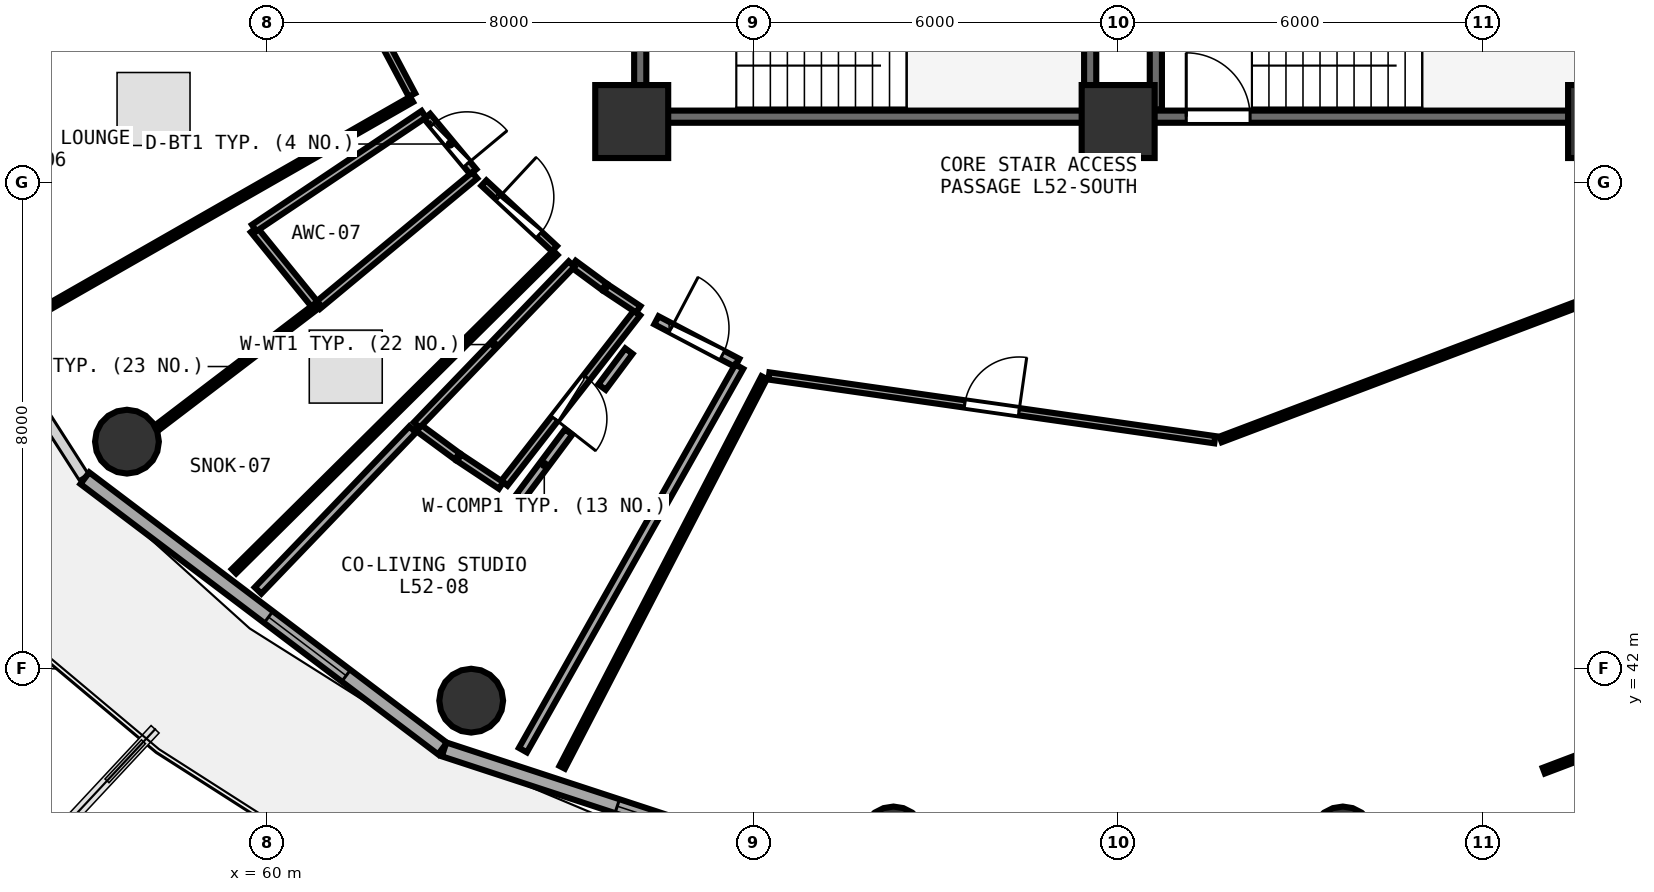
"""IFC4 building model, lengths in metres.
Left out: names, types, materials, properties, quantities, classifications, styles, units other than length and angle.
Written with IfcOpenShell. Run it as: python <this file> out.ifc"""

import sys

from ifc_helpers import new_model, si_unit, direction, frame, frame_2d, origin, origin_2d, place, context, subcontext, project, spatial, rectangle, circle, extrude, element, fill, save


model = new_model("IFC4")
c1 = context("Model", 3, precision=1e-05, world=origin(), true_north=direction((0.0, 1.0)))
c2 = subcontext(c1, "Body", "Model", "MODEL_VIEW")
j1 = project(units=[si_unit("LENGTHUNIT", "METRE"), si_unit("PLANEANGLEUNIT", "RADIAN")], contexts=[c1])
p1 = place(None, origin())
s1 = spatial("IfcSite", under=j1, at=p1, CompositionType="ELEMENT")
p2 = place(p1, origin())
s2 = spatial("IfcBuilding", under=s1, at=p2, CompositionType="ELEMENT")
p3 = place(p2, frame((0.0, 0.0, 204.45)))
s3 = spatial("IfcBuildingStorey", under=s2, at=p3, CompositionType="ELEMENT", Elevation=204.45)
for number, where, z_axis, x_axis in (
    (1, (66.0, 51.0, 0.0), (0.0, 0.0, 1.0), (1.0, 0.0, 0.0)),
    (2, (74.0, 51.0, 0.0), (0.0, 0.0, 1.0), (1.0, 0.0, 0.0)),
    (3, (82.0, 51.0, 0.0), (0.0, 0.0, 1.0), (1.0, 0.0, 0.0)),
):
    element("IfcColumn", number, at=place(p3, frame(where, z_axis=z_axis, x_axis=x_axis)), inside=s3, PredefinedType="PILASTER", context=c2, shape_type="SweptSolid", body=[
        extrude(rectangle(XDim=1.2, YDim=1.2, at=origin_2d()), origin(), (0.0, 0.0, 1.0), 3.75),
    ])
for number, where, z_axis, x_axis in (
    (4, (57.698, 45.736, 0.0), (0.0, 0.0, 1.0), (1.0, 0.0, 0.0)),
    (5, (63.36, 41.476, 0.0), (0.0, 0.0, 1.0), (1.0, 0.0, 0.0)),
    (6, (70.305, 39.21, 0.0), (0.0, 0.0, 1.0), (1.0, 0.0, 0.0)),
    (7, (77.695, 39.21, 0.0), (0.0, 0.0, 1.0), (1.0, 0.0, 0.0)),
):
    element("IfcColumn", number, at=place(p3, frame(where, z_axis=z_axis, x_axis=x_axis)), inside=s3, PredefinedType="COLUMN", context=c2, shape_type="SweptSolid", body=[
        extrude(circle(Radius=0.525, at=origin_2d()), origin(), (0.0, 0.0, 1.0), 3.75),
    ])
p4 = place(p3, frame((57.006, 45.135, 0.0), z_axis=(0.0, 0.0, 1.0), x_axis=(0.797701674595, -0.603052268338, 0.0)))
e8 = element("IfcWall", 8, at=p4, inside=s3, PredefinedType="SOLIDWALL", context=c2, shape_type="SweptSolid", body=[
    extrude(rectangle(XDim=7.374, YDim=0.24, at=frame_2d((3.687, 0.0))), origin(), (0.0, 0.0, 1.0), 3.475),
])
p5 = place(p4, frame((3.787, 0.0, 0.85)))
e9 = element("IfcOpeningElement", 9, at=p5, cuts=e8, PredefinedType="OPENING", context=c2, shape_type="SweptSolid", body=[
    extrude(rectangle(XDim=1.6, YDim=1.45, at=frame_2d((0.8, 0.725))), frame((0.0, 0.13, 0.0), z_axis=(0.0, -1.0, 0.0), x_axis=(1.0, 0.0, 0.0)), (0.0, 0.0, 1.0), 0.26),
])
p6 = place(p3, frame((62.914, 40.675, 0.0), z_axis=(0.0, 0.0, 1.0), x_axis=(0.95022142767, -0.31157541366, 0.0)))
e10 = element("IfcWall", 10, at=p6, inside=s3, PredefinedType="SOLIDWALL", context=c2, shape_type="SweptSolid", body=[
    extrude(rectangle(XDim=7.594, YDim=0.24, at=frame_2d((3.797, 0.0))), origin(), (0.0, 0.0, 1.0), 3.475),
])
p7 = place(p6, frame((2.997, 0.0, 0.85)))
e11 = element("IfcOpeningElement", 11, at=p7, cuts=e10, PredefinedType="OPENING", context=c2, shape_type="SweptSolid", body=[
    extrude(rectangle(XDim=1.6, YDim=1.45, at=frame_2d((0.8, 0.725))), frame((0.0, 0.13, 0.0), z_axis=(0.0, -1.0, 0.0), x_axis=(1.0, 0.0, 0.0)), (0.0, 0.0, 1.0), 0.26),
])
p8 = place(p3, frame((74.0, 51.08, 0.0), z_axis=(0.0, 0.0, 1.0), x_axis=(1.0, 0.0, 0.0)))
e12 = element("IfcWall", 12, at=p8, inside=s3, PredefinedType="SHEAR", context=c2, shape_type="SweptSolid", body=[
    extrude(rectangle(XDim=7.9, YDim=0.2, at=frame_2d((3.95, 0.0))), origin(), (0.0, 0.0, 1.0), 3.49),
])
p9 = place(p8, frame((1.12, 0.0, 0.0)))
e13 = element("IfcOpeningElement", 13, at=p9, cuts=e12, PredefinedType="OPENING", context=c2, shape_type="SweptSolid", body=[
    extrude(rectangle(XDim=1.05, YDim=2.1, at=frame_2d((0.525, 1.05))), frame((0.0, 0.11, 0.0), z_axis=(0.0, -1.0, 0.0), x_axis=(1.0, 0.0, 0.0)), (0.0, 0.0, 1.0), 0.22),
])
p10 = place(p3, frame((74.62, 54.27, 0.0), z_axis=(0.0, 0.0, 1.0), x_axis=(0.0, -1.0, 0.0)))
e14 = element("IfcWall", 14, at=p10, inside=s3, PredefinedType="SHEAR", context=c2, shape_type="SweptSolid", body=[
    extrude(rectangle(XDim=3.07, YDim=0.2, at=frame_2d((1.535, 0.0))), origin(), (0.0, 0.0, 1.0), 3.49),
])
p11 = place(p3, frame((66.26, 51.08, 0.0), z_axis=(0.0, 0.0, 1.0), x_axis=(1.0, 0.0, 0.0)))
e15 = element("IfcWall", 15, at=p11, inside=s3, PredefinedType="SHEAR", context=c2, shape_type="SweptSolid", body=[
    extrude(rectangle(XDim=7.16, YDim=0.2, at=frame_2d((3.58, 0.0))), origin(), (0.0, 0.0, 1.0), 3.49),
])
p12 = place(p3, frame((73.54, 51.2, 0.0), z_axis=(0.0, 0.0, 1.0), x_axis=(0.0, 1.0, 0.0)))
e16 = element("IfcWall", 16, at=p12, inside=s3, PredefinedType="SHEAR", context=c2, shape_type="SweptSolid", body=[
    extrude(rectangle(XDim=3.07, YDim=0.2, at=frame_2d((1.535, 0.0))), origin(), (0.0, 0.0, 1.0), 3.49),
])
p13 = place(p3, frame((66.14, 54.27, 0.0), z_axis=(0.0, 0.0, 1.0), x_axis=(0.0, -1.0, 0.0)))
e17 = element("IfcWall", 17, at=p13, inside=s3, PredefinedType="SHEAR", context=c2, shape_type="SweptSolid", body=[
    extrude(rectangle(XDim=3.07, YDim=0.2, at=frame_2d((1.535, 0.0))), origin(), (0.0, 0.0, 1.0), 3.49),
])
p14 = place(p13, frame((1.01, 0.0, 0.0)))
e18 = element("IfcOpeningElement", 18, at=p14, cuts=e17, PredefinedType="OPENING", context=c2, shape_type="SweptSolid", body=[
    extrude(rectangle(XDim=1.05, YDim=2.1, at=frame_2d((0.525, 1.05))), frame((0.0, 0.11, 0.0), z_axis=(0.0, -1.0, 0.0), x_axis=(1.0, 0.0, 0.0)), (0.0, 0.0, 1.0), 0.22),
])
p15 = place(p3, frame((68.256, 46.816, 0.0), z_axis=(0.0, 0.0, 1.0), x_axis=(0.989926410659, -0.141582843167, 0.0)))
e19 = element("IfcWall", 19, at=p15, inside=s3, PredefinedType="PARTITIONING", context=c2, shape_type="SweptSolid", body=[
    extrude(rectangle(XDim=7.408, YDim=0.12, at=frame_2d((3.704, 0.0))), origin(), (0.0, 0.0, 1.0), 3.025),
])
p16 = place(p15, frame((3.254, 0.0, 0.0)))
e20 = element("IfcOpeningElement", 20, at=p16, cuts=e19, PredefinedType="OPENING", context=c2, shape_type="SweptSolid", body=[
    extrude(rectangle(XDim=0.9, YDim=2.08, at=frame_2d((0.45, 1.04))), frame((0.0, 0.07, 0.0), z_axis=(0.0, -1.0, 0.0), x_axis=(1.0, 0.0, 0.0)), (0.0, 0.0, 1.0), 0.14),
])
p17 = place(p3, frame((61.009, 54.03, 0.0), z_axis=(0.0, 0.0, 1.0), x_axis=(0.468999166779, -0.883198608219, 0.0)))
e21 = element("IfcWall", 21, at=p17, inside=s3, PredefinedType="PARTITIONING", context=c2, shape_type="SweptSolid", body=[
    extrude(rectangle(XDim=2.936, YDim=0.12, at=frame_2d((1.468, 0.0))), origin(), (0.0, 0.0, 1.0), 3.235),
])
p18 = place(p17, frame((1.018, 0.0, 0.0)))
e22 = element("IfcOpeningElement", 22, at=p18, cuts=e21, PredefinedType="OPENING", context=c2, shape_type="SweptSolid", body=[
    extrude(rectangle(XDim=0.9, YDim=2.08, at=frame_2d((0.45, 1.04))), frame((0.0, 0.07, 0.0), z_axis=(0.0, -1.0, 0.0), x_axis=(1.0, 0.0, 0.0)), (0.0, 0.0, 1.0), 0.14),
])
p19 = place(p3, frame((62.635, 51.086, 0.0), z_axis=(0.0, 0.0, 1.0), x_axis=(0.639759255057, -0.768575367526, 0.0)))
e23 = element("IfcWall", 23, at=p19, inside=s3, PredefinedType="PLUMBINGWALL", context=c2, shape_type="SweptSolid", body=[
    extrude(rectangle(XDim=1.187, YDim=0.13, at=frame_2d((0.593, 0.0))), origin(), (0.0, 0.0, 1.0), 3.025),
])
p20 = place(p19, frame((0.163, 0.0, 0.0)))
e24 = element("IfcOpeningElement", 24, at=p20, cuts=e23, PredefinedType="OPENING", context=c2, shape_type="SweptSolid", body=[
    extrude(rectangle(XDim=0.86, YDim=2.05, at=frame_2d((0.43, 1.025))), frame((0.0, 0.075, 0.0), z_axis=(0.0, -1.0, 0.0), x_axis=(1.0, 0.0, 0.0)), (0.0, 0.0, 1.0), 0.15),
])
p21 = place(p3, frame((63.569, 49.988, 0.0), z_axis=(0.0, 0.0, 1.0), x_axis=(0.732453034456, -0.680817561698, 0.0)))
e25 = element("IfcWall", 25, at=p21, inside=s3, PredefinedType="PARTITIONING", context=c2, shape_type="SweptSolid", body=[
    extrude(rectangle(XDim=1.584, YDim=0.12, at=frame_2d((0.792, 0.0))), origin(), (0.0, 0.0, 1.0), 3.025),
])
p22 = place(p21, frame((0.342, 0.0, 0.0)))
e26 = element("IfcOpeningElement", 26, at=p22, cuts=e25, PredefinedType="OPENING", context=c2, shape_type="SweptSolid", body=[
    extrude(rectangle(XDim=0.9, YDim=2.08, at=frame_2d((0.45, 1.04))), frame((0.0, 0.07, 0.0), z_axis=(0.0, -1.0, 0.0), x_axis=(1.0, 0.0, 0.0)), (0.0, 0.0, 1.0), 0.14),
])
p23 = place(p3, frame((66.088, 47.853, 0.0), z_axis=(0.0, 0.0, 1.0), x_axis=(-0.614711227896, -0.788752246462, 0.0)))
e27 = element("IfcWall", 27, at=p23, inside=s3, PredefinedType="PLUMBINGWALL", context=c2, shape_type="SweptSolid", body=[
    extrude(rectangle(XDim=3.552, YDim=0.13, at=frame_2d((1.776, 0.0))), origin(), (0.0, 0.0, 1.0), 3.025),
])
p24 = place(p23, frame((1.346, 0.0, 0.0)))
e28 = element("IfcOpeningElement", 28, at=p24, cuts=e27, PredefinedType="OPENING", context=c2, shape_type="SweptSolid", body=[
    extrude(rectangle(XDim=0.86, YDim=2.05, at=frame_2d((0.43, 1.025))), frame((0.0, 0.075, 0.0), z_axis=(0.0, -1.0, 0.0), x_axis=(1.0, 0.0, 0.0)), (0.0, 0.0, 1.0), 0.15),
])
p25 = place(p3, frame((66.406, 47.732, 0.0), z_axis=(0.0, 0.0, 1.0), x_axis=(0.884766555002, -0.466034487083, 0.0)))
e29 = element("IfcWall", 29, at=p25, inside=s3, PredefinedType="PARTITIONING", context=c2, shape_type="SweptSolid", body=[
    extrude(rectangle(XDim=1.502, YDim=0.15, at=frame_2d((0.751, 0.0))), origin(), (0.0, 0.0, 1.0), 3.235),
])
p26 = place(p25, frame((0.276, 0.0, 0.0)))
e30 = element("IfcOpeningElement", 30, at=p26, cuts=e29, PredefinedType="OPENING", context=c2, shape_type="SweptSolid", body=[
    extrude(rectangle(XDim=0.95, YDim=2.08, at=frame_2d((0.475, 1.04))), frame((0.0, 0.085, 0.0), z_axis=(0.0, -1.0, 0.0), x_axis=(1.0, 0.0, 0.0)), (0.0, 0.0, 1.0), 0.17),
])
p27 = place(p3, frame((75.686, 45.773, 0.0), z_axis=(0.0, 0.0, 1.0), x_axis=(0.935263689731, 0.353951734945, 0.0)))
e31 = element("IfcWall", 31, at=p27, inside=s3, PredefinedType="PARTITIONING", context=c2, shape_type="SweptSolid", body=[
    extrude(rectangle(XDim=7.355, YDim=0.1, at=frame_2d((3.678, 0.0))), origin(), (0.0, 0.0, 1.0), 3.025),
])
p28 = place(p3, frame((81.849, 40.646, 0.0), z_axis=(0.0, 0.0, 1.0), x_axis=(-0.935240492297, -0.354013024574, 0.0)))
e32 = element("IfcWall", 32, at=p28, inside=s3, PredefinedType="PARTITIONING", context=c2, shape_type="SweptSolid", body=[
    extrude(rectangle(XDim=0.907, YDim=0.1, at=frame_2d((0.454, 0.0))), origin(), (0.0, 0.0, 1.0), 3.075),
])
p29 = place(p3, frame((64.856, 40.381, 0.0), z_axis=(0.0, 0.0, 1.0), x_axis=(0.460220418691, 0.887804689231, 0.0)))
e33 = element("IfcWall", 33, at=p29, inside=s3, PredefinedType="PARTITIONING", context=c2, shape_type="SweptSolid", body=[
    extrude(rectangle(XDim=7.219, YDim=0.1, at=frame_2d((3.609, 0.0))), origin(), (0.0, 0.0, 1.0), 3.075),
])
p30 = place(p3, frame((62.379, 51.364, 0.0), z_axis=(0.0, 0.0, 1.0), x_axis=(-0.868127220156, -0.496341746808, 0.0)))
e34 = element("IfcWall", 34, at=p30, inside=s3, PredefinedType="PARTITIONING", context=c2, shape_type="SweptSolid", body=[
    extrude(rectangle(XDim=7.648, YDim=0.1, at=frame_2d((3.824, 0.0))), origin(), (0.0, 0.0, 1.0), 3.025),
])
p31 = place(p3, frame((54.114, 52.013, 0.0), z_axis=(0.0, 0.0, 1.0), x_axis=(0.957454305291, 0.288584915198, 0.0)))
e35 = element("IfcWall", 35, at=p31, inside=s3, PredefinedType="PARTITIONING", context=c2, shape_type="SweptSolid", body=[
    extrude(rectangle(XDim=7.133, YDim=0.1, at=frame_2d((3.566, 0.0))), origin(), (0.0, 0.0, 1.0), 3.075),
])
p32 = place(p3, frame((63.417, 50.115, 0.0), z_axis=(0.0, 0.0, 1.0), x_axis=(-0.76963081868, -0.638489156477, 0.0)))
e36 = element("IfcWall", 36, at=p32, inside=s3, PredefinedType="PLUMBINGWALL", context=c2, shape_type="SweptSolid", body=[
    extrude(rectangle(XDim=3.36, YDim=0.13, at=frame_2d((1.68, 0.0))), origin(), (0.0, 0.0, 1.0), 3.175),
])
p33 = place(p3, frame((60.803, 47.972, 0.0), z_axis=(0.0, 0.0, 1.0), x_axis=(-0.631048835574, 0.775743106396, 0.0)))
e37 = element("IfcWall", 37, at=p33, inside=s3, PredefinedType="PLUMBINGWALL", context=c2, shape_type="SweptSolid", body=[
    extrude(rectangle(XDim=1.611, YDim=0.13, at=frame_2d((0.806, 0.0))), origin(), (0.0, 0.0, 1.0), 3.175),
])
p34 = place(p3, frame((59.791, 49.249, 0.0), z_axis=(0.0, 0.0, 1.0), x_axis=(0.830403176275, 0.557162960751, 0.0)))
e38 = element("IfcWall", 38, at=p34, inside=s3, PredefinedType="PLUMBINGWALL", context=c2, shape_type="SweptSolid", body=[
    extrude(rectangle(XDim=3.36, YDim=0.13, at=frame_2d((1.68, 0.0))), origin(), (0.0, 0.0, 1.0), 3.025),
])
p35 = place(p3, frame((64.745, 48.841, 0.0), z_axis=(0.0, 0.0, 1.0), x_axis=(-0.710363664194, -0.703834827635, 0.0)))
e39 = element("IfcWall", 39, at=p35, inside=s3, PredefinedType="PARTITIONING", context=c2, shape_type="SweptSolid", body=[
    extrude(rectangle(XDim=7.441, YDim=0.1, at=frame_2d((3.721, 0.0))), origin(), (0.0, 0.0, 1.0), 3.075),
])
p36 = place(p3, frame((58.197, 45.969, 0.0), z_axis=(0.0, 0.0, 1.0), x_axis=(0.79535379018, 0.606145484555, 0.0)))
e40 = element("IfcWall", 40, at=p36, inside=s3, PredefinedType="PARTITIONING", context=c2, shape_type="SweptSolid", body=[
    extrude(rectangle(XDim=3.308, YDim=0.1, at=frame_2d((1.654, 0.0))), origin(), (0.0, 0.0, 1.0), 3.025),
])
p37 = place(p3, frame((65.04, 48.658, 0.0), z_axis=(0.0, 0.0, 1.0), x_axis=(0.804987739936, -0.593291444867, 0.0)))
e41 = element("IfcWall", 41, at=p37, inside=s3, PredefinedType="PLUMBINGWALL", context=c2, shape_type="SweptSolid", body=[
    extrude(rectangle(XDim=0.631, YDim=0.13, at=frame_2d((0.315, 0.0))), origin(), (0.0, 0.0, 1.0), 3.025),
])
p38 = place(p3, frame((65.581, 48.261, 0.0), z_axis=(0.0, 0.0, 1.0), x_axis=(0.83341242139, -0.55265155014, 0.0)))
e42 = element("IfcWall", 42, at=p38, inside=s3, PredefinedType="PLUMBINGWALL", context=c2, shape_type="SweptSolid", body=[
    extrude(rectangle(XDim=0.633, YDim=0.13, at=frame_2d((0.316, 0.0))), origin(), (0.0, 0.0, 1.0), 3.48),
])
p39 = place(p3, frame((63.851, 45.015, 0.0), z_axis=(0.0, 0.0, 1.0), x_axis=(-0.833365951339, 0.552721621749, 0.0)))
e43 = element("IfcWall", 43, at=p39, inside=s3, PredefinedType="PLUMBINGWALL", context=c2, shape_type="SweptSolid", body=[
    extrude(rectangle(XDim=0.826, YDim=0.13, at=frame_2d((0.413, 0.0))), origin(), (0.0, 0.0, 1.0), 3.48),
])
p40 = place(p3, frame((63.13, 45.495, 0.0), z_axis=(0.0, 0.0, 1.0), x_axis=(-0.805130367536, 0.593097876638, 0.0)))
e44 = element("IfcWall", 44, at=p40, inside=s3, PredefinedType="PLUMBINGWALL", context=c2, shape_type="SweptSolid", body=[
    extrude(rectangle(XDim=0.823, YDim=0.13, at=frame_2d((0.412, 0.0))), origin(), (0.0, 0.0, 1.0), 3.48),
])
p41 = place(p3, frame((62.465, 46.01, 0.0), z_axis=(0.0, 0.0, 1.0), x_axis=(0.693241598237, 0.720705270186, 0.0)))
e45 = element("IfcWall", 45, at=p41, inside=s3, PredefinedType="PLUMBINGWALL", context=c2, shape_type="SweptSolid", body=[
    extrude(rectangle(XDim=3.671, YDim=0.13, at=frame_2d((1.836, 0.0))), origin(), (0.0, 0.0, 1.0), 3.175),
])
p42 = place(p3, frame((67.768, 46.969, 0.0), z_axis=(0.0, 0.0, 1.0), x_axis=(-0.491338239217, -0.870968848285, 0.0)))
e46 = element("IfcWall", 46, at=p42, inside=s3, PredefinedType="PARTITIONING", context=c2, shape_type="SweptSolid", body=[
    extrude(rectangle(XDim=7.241, YDim=0.15, at=frame_2d((3.62, 0.0))), origin(), (0.0, 0.0, 1.0), 3.075),
])
p43 = place(p3, frame((59.855, 43.288, 0.0), z_axis=(0.0, 0.0, 1.0), x_axis=(0.692562282737, 0.72135808343, 0.0)))
e47 = element("IfcWall", 47, at=p43, inside=s3, PredefinedType="PARTITIONING", context=c2, shape_type="SweptSolid", body=[
    extrude(rectangle(XDim=3.671, YDim=0.15, at=frame_2d((1.835, 0.0))), origin(), (0.0, 0.0, 1.0), 3.075),
])
p44 = place(p3, frame((64.162, 44.823, 0.0), z_axis=(0.0, 0.0, 1.0), x_axis=(0.597925227294, 0.801551883889, 0.0)))
e48 = element("IfcWall", 48, at=p44, inside=s3, PredefinedType="PARTITIONING", context=c2, shape_type="SweptSolid", body=[
    extrude(rectangle(XDim=1.338, YDim=0.15, at=frame_2d((0.669, 0.0))), origin(), (0.0, 0.0, 1.0), 3.025),
])
p45 = place(p3, frame((65.512, 46.633, 0.0), z_axis=(0.0, 0.0, 1.0), x_axis=(0.598093921347, 0.801426017327, 0.0)))
e49 = element("IfcWall", 49, at=p45, inside=s3, PredefinedType="PARTITIONING", context=c2, shape_type="SweptSolid", body=[
    extrude(rectangle(XDim=0.739, YDim=0.15, at=frame_2d((0.369, 0.0))), origin(), (0.0, 0.0, 1.0), 3.235),
])
p46 = place(p5, origin())
e50 = element("IfcWindow", 50, at=p46, inside=s3, PartitioningType="SINGLE_PANEL", PredefinedType="WINDOW", context=c2, shape_type="SweptSolid", body=[
    extrude(rectangle(XDim=1.6, YDim=1.45, at=frame_2d((0.8, 0.725))), frame((0.0, 0.03, 0.0), z_axis=(0.0, -1.0, 0.0), x_axis=(1.0, 0.0, 0.0)), (0.0, 0.0, 1.0), 0.06),
])
fill(e9, e50)
p47 = place(p7, origin())
e51 = element("IfcWindow", 51, at=p47, inside=s3, PartitioningType="SINGLE_PANEL", PredefinedType="WINDOW", context=c2, shape_type="SweptSolid", body=[
    extrude(rectangle(XDim=1.6, YDim=1.45, at=frame_2d((0.8, 0.725))), frame((0.0, 0.03, 0.0), z_axis=(0.0, -1.0, 0.0), x_axis=(1.0, 0.0, 0.0)), (0.0, 0.0, 1.0), 0.06),
])
fill(e11, e51)
p48 = place(p9, origin())
e52 = element("IfcDoor", 52, at=p48, inside=s3, OperationType="SINGLE_SWING_LEFT", PredefinedType="DOOR", context=c2, shape_type="SweptSolid", body=[
    extrude(rectangle(XDim=1.05, YDim=2.1, at=frame_2d((0.525, 1.05))), frame((0.0, 0.025, 0.0), z_axis=(0.0, -1.0, 0.0), x_axis=(1.0, 0.0, 0.0)), (0.0, 0.0, 1.0), 0.05),
])
fill(e13, e52)
p49 = place(p16, origin())
e53 = element("IfcDoor", 53, at=p49, inside=s3, OperationType="SINGLE_SWING_RIGHT", PredefinedType="DOOR", context=c2, shape_type="SweptSolid", body=[
    extrude(rectangle(XDim=0.9, YDim=2.08, at=frame_2d((0.45, 1.04))), frame((0.0, 0.025, 0.0), z_axis=(0.0, -1.0, 0.0), x_axis=(1.0, 0.0, 0.0)), (0.0, 0.0, 1.0), 0.05),
])
fill(e20, e53)
p50 = place(p20, origin())
e54 = element("IfcDoor", 54, at=p50, inside=s3, OperationType="SINGLE_SWING_RIGHT", PredefinedType="DOOR", context=c2, shape_type="SweptSolid", body=[
    extrude(rectangle(XDim=0.86, YDim=2.05, at=frame_2d((0.43, 1.025))), frame((0.0, 0.025, 0.0), z_axis=(0.0, -1.0, 0.0), x_axis=(1.0, 0.0, 0.0)), (0.0, 0.0, 1.0), 0.05),
])
fill(e24, e54)
p51 = place(p22, origin())
e55 = element("IfcDoor", 55, at=p51, inside=s3, OperationType="SINGLE_SWING_LEFT", PredefinedType="DOOR", context=c2, shape_type="SweptSolid", body=[
    extrude(rectangle(XDim=0.9, YDim=2.08, at=frame_2d((0.45, 1.04))), frame((0.0, 0.025, 0.0), z_axis=(0.0, -1.0, 0.0), x_axis=(1.0, 0.0, 0.0)), (0.0, 0.0, 1.0), 0.05),
])
fill(e26, e55)
p52 = place(p24, origin())
e56 = element("IfcDoor", 56, at=p52, inside=s3, OperationType="SINGLE_SWING_RIGHT", PredefinedType="DOOR", context=c2, shape_type="SweptSolid", body=[
    extrude(rectangle(XDim=0.86, YDim=2.05, at=frame_2d((0.43, 1.025))), frame((0.0, 0.025, 0.0), z_axis=(0.0, -1.0, 0.0), x_axis=(1.0, 0.0, 0.0)), (0.0, 0.0, 1.0), 0.05),
])
fill(e28, e56)
p53 = place(p26, origin())
e57 = element("IfcDoor", 57, at=p53, inside=s3, OperationType="SINGLE_SWING_LEFT", PredefinedType="DOOR", context=c2, shape_type="SweptSolid", body=[
    extrude(rectangle(XDim=0.95, YDim=2.08, at=frame_2d((0.475, 1.04))), frame((0.0, 0.025, 0.0), z_axis=(0.0, -1.0, 0.0), x_axis=(1.0, 0.0, 0.0)), (0.0, 0.0, 1.0), 0.05),
])
fill(e30, e57)
save(model, sys.argv[1])
